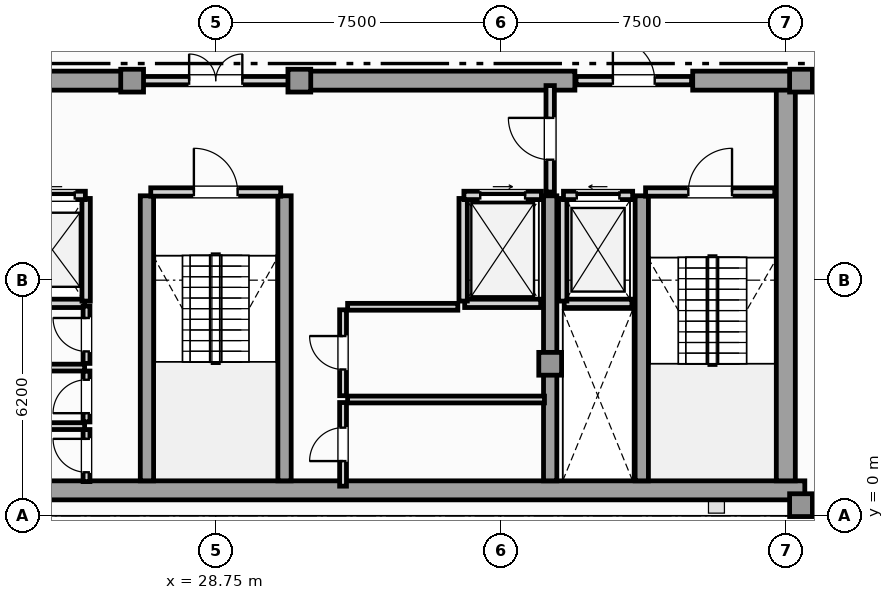
"""IFC4 building model, lengths in metres.
Left out: names, types, materials, properties, quantities, classifications, styles, units other than length and angle.
Written with IfcOpenShell. Run it as: python <this file> out.ifc"""

import sys

from ifc_helpers import new_model, si_unit, direction, frame, frame_2d, origin, origin_2d, place, context, subcontext, project, spatial, rectangle, extrude, element, fill, save


model = new_model("IFC4")
c1 = context("Model", 3, precision=1e-05, world=origin(), true_north=direction((0.0, 1.0)))
c2 = subcontext(c1, "Body", "Model", "MODEL_VIEW")
j1 = project(units=[si_unit("LENGTHUNIT", "METRE"), si_unit("PLANEANGLEUNIT", "RADIAN")], contexts=[c1])
p1 = place(None, origin())
s1 = spatial("IfcSite", under=j1, at=p1, CompositionType="ELEMENT")
p2 = place(p1, origin())
s2 = spatial("IfcBuilding", under=s1, at=p2, CompositionType="ELEMENT")
p3 = place(p2, frame((0.0, 0.0, 316.9)))
s3 = spatial("IfcBuildingStorey", under=s2, at=p3, CompositionType="ELEMENT", Elevation=316.9)
p4 = place(p3, frame((13.25, 0.67, 0.0), z_axis=(0.0, 0.0, 1.0), x_axis=(1.0, 0.0, 0.0)))
e1 = element("IfcWall", 1, at=p4, inside=s3, PredefinedType="SHEAR", context=c2, shape_type="SweptSolid", body=[
    extrude(rectangle(XDim=31.0, YDim=0.5, at=frame_2d((15.5, 0.0))), origin(), (0.0, 0.0, 1.0), 3.65),
])
p5 = place(p3, frame((43.75, 0.92, 0.0), z_axis=(0.0, 0.0, 1.0), x_axis=(0.0, 1.0, 0.0)))
e2 = element("IfcWall", 2, at=p5, inside=s3, PredefinedType="SHEAR", context=c2, shape_type="SweptSolid", body=[
    extrude(rectangle(XDim=10.53, YDim=0.5, at=frame_2d((5.265, 0.0))), origin(), (0.0, 0.0, 1.0), 3.65),
])
for number, where, z_axis, x_axis in (
    (3, (19.3, 11.45, 0.0), (0.0, 0.0, 1.0), (1.0, 0.0, 0.0)),
    (4, (30.9, 11.45, 0.0), (0.0, 0.0, 1.0), (1.0, 0.0, 0.0)),
):
    element("IfcWall", number, at=place(p3, frame(where, z_axis=z_axis, x_axis=x_axis)), inside=s3, PredefinedType="SHEAR", context=c2, shape_type="SweptSolid", body=[
        extrude(rectangle(XDim=7.3, YDim=0.5, at=frame_2d((3.65, 0.0))), origin(), (0.0, 0.0, 1.0), 3.65),
    ])
p6 = place(p3, frame((41.3, 11.45, 0.0), z_axis=(0.0, 0.0, 1.0), x_axis=(1.0, 0.0, 0.0)))
e5 = element("IfcWall", 5, at=p6, inside=s3, PredefinedType="SHEAR", context=c2, shape_type="SweptSolid", body=[
    extrude(rectangle(XDim=2.95, YDim=0.5, at=frame_2d((1.475, 0.0))), origin(), (0.0, 0.0, 1.0), 3.65),
])
for number, where, z_axis, x_axis in (
    (6, (26.94, 0.92, 0.0), (0.0, 0.0, 1.0), (0.0, 1.0, 0.0)),
    (7, (30.56, 0.92, 0.0), (0.0, 0.0, 1.0), (0.0, 1.0, 0.0)),
    (8, (37.55, 0.92, 0.0), (0.0, 0.0, 1.0), (0.0, 1.0, 0.0)),
    (9, (39.96, 0.92, 0.0), (0.0, 0.0, 1.0), (0.0, 1.0, 0.0)),
):
    element("IfcWall", number, at=place(p3, frame(where, z_axis=z_axis, x_axis=x_axis)), inside=s3, PredefinedType="SHEAR", context=c2, shape_type="SweptSolid", body=[
        extrude(rectangle(XDim=7.5, YDim=0.35, at=frame_2d((3.75, 0.0))), origin(), (0.0, 0.0, 1.0), 3.65),
    ])
for number, where, z_axis, x_axis in (
    (10, (44.15, 0.28, 0.0), (0.0, 0.0, 1.0), (1.0, 0.0, 0.0)),
    (11, (44.15, 11.45, 0.0), (0.0, 0.0, 1.0), (1.0, 0.0, 0.0)),
    (12, (37.55, 4.0, 0.0), (0.0, 0.0, 1.0), (1.0, 0.0, 0.0)),
    (13, (26.55, 11.45, 0.0), (0.0, 0.0, 1.0), (1.0, 0.0, 0.0)),
    (14, (30.95, 11.45, 0.0), (0.0, 0.0, 1.0), (1.0, 0.0, 0.0)),
):
    element("IfcColumn", number, at=place(p3, frame(where, z_axis=z_axis, x_axis=x_axis)), inside=s3, PredefinedType="COLUMN", context=c2, shape_type="SweptSolid", body=[
        extrude(rectangle(XDim=0.6, YDim=0.6, at=origin_2d()), origin(), (0.0, 0.0, 1.0), 3.85),
    ])
p7 = place(p3, frame((44.25, 0.18, 0.0), z_axis=(0.0, 0.0, 1.0), x_axis=(1.0, 0.0, 0.0)))
e15 = element("IfcWall", 15, at=p7, inside=s3, PredefinedType="SOLIDWALL", context=c2, shape_type="SweptSolid", body=[
    extrude(rectangle(XDim=1.017, YDim=0.26, at=frame_2d((0.509, 0.0))), origin(), (0.0, 0.0, 1.0), 3.65),
])
p8 = place(p3, frame((37.92, 5.59, 0.0), z_axis=(0.0, 0.0, 1.0), x_axis=(1.0, 0.0, 0.0)))
e16 = element("IfcWall", 16, at=p8, inside=s3, PredefinedType="SOLIDWALL", context=c2, shape_type="SweptSolid", body=[
    extrude(rectangle(XDim=1.78, YDim=0.22, at=frame_2d((0.89, 0.0))), origin(), (0.0, 0.0, 1.0), 3.65),
])
p9 = place(p3, frame((37.88, 5.65, 0.0), z_axis=(0.0, 0.0, 1.0), x_axis=(0.0, 1.0, 0.0)))
e17 = element("IfcWall", 17, at=p9, inside=s3, PredefinedType="SOLIDWALL", context=c2, shape_type="SweptSolid", body=[
    extrude(rectangle(XDim=2.7, YDim=0.22, at=frame_2d((1.35, 0.0))), origin(), (0.0, 0.0, 1.0), 3.65),
])
p10 = place(p3, frame((37.9, 8.43, 0.0), z_axis=(0.0, 0.0, 1.0), x_axis=(1.0, 0.0, 0.0)))
e18 = element("IfcWall", 18, at=p10, inside=s3, PredefinedType="SOLIDWALL", context=c2, shape_type="SweptSolid", body=[
    extrude(rectangle(XDim=1.82, YDim=0.22, at=frame_2d((0.91, 0.0))), origin(), (0.0, 0.0, 1.0), 3.65),
])
p11 = place(p10, frame((0.35, 0.0, 0.0)))
e19 = element("IfcOpeningElement", 19, at=p11, cuts=e18, PredefinedType="OPENING", context=c2, shape_type="SweptSolid", body=[
    extrude(rectangle(XDim=1.12, YDim=2.25, at=frame_2d((0.56, 1.125))), frame((0.0, 0.12, 0.0), z_axis=(0.0, -1.0, 0.0), x_axis=(1.0, 0.0, 0.0)), (0.0, 0.0, 1.0), 0.24),
])
p12 = place(p3, frame((35.3, 5.59, 0.0), z_axis=(0.0, 0.0, 1.0), x_axis=(1.0, 0.0, 0.0)))
e20 = element("IfcWall", 20, at=p12, inside=s3, PredefinedType="SOLIDWALL", context=c2, shape_type="SweptSolid", body=[
    extrude(rectangle(XDim=2.0, YDim=0.22, at=frame_2d((1.0, 0.0))), origin(), (0.0, 0.0, 1.0), 3.65),
])
p13 = place(p3, frame((35.26, 5.65, 0.0), z_axis=(0.0, 0.0, 1.0), x_axis=(0.0, 1.0, 0.0)))
e21 = element("IfcWall", 21, at=p13, inside=s3, PredefinedType="SOLIDWALL", context=c2, shape_type="SweptSolid", body=[
    extrude(rectangle(XDim=2.7, YDim=0.22, at=frame_2d((1.35, 0.0))), origin(), (0.0, 0.0, 1.0), 3.65),
])
p14 = place(p3, frame((35.28, 8.43, 0.0), z_axis=(0.0, 0.0, 1.0), x_axis=(1.0, 0.0, 0.0)))
e22 = element("IfcWall", 22, at=p14, inside=s3, PredefinedType="SOLIDWALL", context=c2, shape_type="SweptSolid", body=[
    extrude(rectangle(XDim=2.04, YDim=0.22, at=frame_2d((1.02, 0.0))), origin(), (0.0, 0.0, 1.0), 3.65),
])
p15 = place(p14, frame((0.43, 0.0, 0.0)))
e23 = element("IfcOpeningElement", 23, at=p15, cuts=e22, PredefinedType="OPENING", context=c2, shape_type="SweptSolid", body=[
    extrude(rectangle(XDim=1.18, YDim=2.2, at=frame_2d((0.59, 1.1))), frame((0.0, 0.12, 0.0), z_axis=(0.0, -1.0, 0.0), x_axis=(1.0, 0.0, 0.0)), (0.0, 0.0, 1.0), 0.24),
])
p16 = place(p3, frame((23.6, 5.59, 0.0), z_axis=(0.0, 0.0, 1.0), x_axis=(1.0, 0.0, 0.0)))
e24 = element("IfcWall", 24, at=p16, inside=s3, PredefinedType="SOLIDWALL", context=c2, shape_type="SweptSolid", body=[
    extrude(rectangle(XDim=1.7, YDim=0.22, at=frame_2d((0.85, 0.0))), origin(), (0.0, 0.0, 1.0), 3.65),
])
p17 = place(p3, frame((25.34, 5.65, 0.0), z_axis=(0.0, 0.0, 1.0), x_axis=(0.0, 1.0, 0.0)))
e25 = element("IfcWall", 25, at=p17, inside=s3, PredefinedType="SOLIDWALL", context=c2, shape_type="SweptSolid", body=[
    extrude(rectangle(XDim=2.7, YDim=0.22, at=frame_2d((1.35, 0.0))), origin(), (0.0, 0.0, 1.0), 3.65),
])
p18 = place(p3, frame((23.58, 8.43, 0.0), z_axis=(0.0, 0.0, 1.0), x_axis=(1.0, 0.0, 0.0)))
e26 = element("IfcWall", 26, at=p18, inside=s3, PredefinedType="SOLIDWALL", context=c2, shape_type="SweptSolid", body=[
    extrude(rectangle(XDim=1.74, YDim=0.22, at=frame_2d((0.87, 0.0))), origin(), (0.0, 0.0, 1.0), 3.65),
])
p19 = place(p18, frame((0.28, 0.0, 0.0)))
e27 = element("IfcOpeningElement", 27, at=p19, cuts=e26, PredefinedType="OPENING", context=c2, shape_type="SweptSolid", body=[
    extrude(rectangle(XDim=1.18, YDim=2.2, at=frame_2d((0.59, 1.1))), frame((0.0, 0.12, 0.0), z_axis=(0.0, -1.0, 0.0), x_axis=(1.0, 0.0, 0.0)), (0.0, 0.0, 1.0), 0.24),
])
p20 = place(p3, frame((40.06, 8.52, 0.0), z_axis=(0.0, 0.0, 1.0), x_axis=(1.0, 0.0, 0.0)))
e28 = element("IfcWall", 28, at=p20, inside=s3, PredefinedType="SOLIDWALL", context=c2, shape_type="SweptSolid", body=[
    extrude(rectangle(XDim=3.4, YDim=0.22, at=frame_2d((1.7, 0.0))), origin(), (0.0, 0.0, 1.0), 3.65),
])
p21 = place(p20, frame((1.125, 0.0, 0.0)))
e29 = element("IfcOpeningElement", 29, at=p21, cuts=e28, PredefinedType="OPENING", context=c2, shape_type="SweptSolid", body=[
    extrude(rectangle(XDim=1.15, YDim=2.2, at=frame_2d((0.575, 1.1))), frame((0.0, 0.12, 0.0), z_axis=(0.0, -1.0, 0.0), x_axis=(1.0, 0.0, 0.0)), (0.0, 0.0, 1.0), 0.24),
])
p22 = place(p3, frame((27.04, 8.52, 0.0), z_axis=(0.0, 0.0, 1.0), x_axis=(1.0, 0.0, 0.0)))
e30 = element("IfcWall", 30, at=p22, inside=s3, PredefinedType="SOLIDWALL", context=c2, shape_type="SweptSolid", body=[
    extrude(rectangle(XDim=3.42, YDim=0.22, at=frame_2d((1.71, 0.0))), origin(), (0.0, 0.0, 1.0), 3.65),
])
p23 = place(p22, frame((1.135, 0.0, 0.0)))
e31 = element("IfcOpeningElement", 31, at=p23, cuts=e30, PredefinedType="OPENING", context=c2, shape_type="SweptSolid", body=[
    extrude(rectangle(XDim=1.15, YDim=2.2, at=frame_2d((0.575, 1.1))), frame((0.0, 0.12, 0.0), z_axis=(0.0, -1.0, 0.0), x_axis=(1.0, 0.0, 0.0)), (0.0, 0.0, 1.0), 0.24),
])
p24 = place(p3, frame((37.55, 8.52, 0.0), z_axis=(0.0, 0.0, 1.0), x_axis=(0.0, 1.0, 0.0)))
e32 = element("IfcWall", 32, at=p24, inside=s3, PredefinedType="SOLIDWALL", context=c2, shape_type="SweptSolid", body=[
    extrude(rectangle(XDim=2.8, YDim=0.22, at=frame_2d((1.4, 0.0))), origin(), (0.0, 0.0, 1.0), 3.106),
])
p25 = place(p24, frame((0.85, 0.0, 0.0)))
e33 = element("IfcOpeningElement", 33, at=p25, cuts=e32, PredefinedType="OPENING", context=c2, shape_type="SweptSolid", body=[
    extrude(rectangle(XDim=1.1, YDim=2.2, at=frame_2d((0.55, 1.1))), frame((0.0, 0.12, 0.0), z_axis=(0.0, -1.0, 0.0), x_axis=(1.0, 0.0, 0.0)), (0.0, 0.0, 1.0), 0.24),
])
p26 = place(p3, frame((26.63, 11.45, 0.0), z_axis=(0.0, 0.0, 1.0), x_axis=(1.0, 0.0, 0.0)))
e34 = element("IfcWall", 34, at=p26, inside=s3, PredefinedType="SOLIDWALL", context=c2, shape_type="SweptSolid", body=[
    extrude(rectangle(XDim=4.24, YDim=0.22, at=frame_2d((2.12, 0.0))), origin(), (0.0, 0.0, 1.0), 3.65),
])
p27 = place(p26, frame((1.42, 0.0, 0.0)))
e35 = element("IfcOpeningElement", 35, at=p27, cuts=e34, PredefinedType="OPENING", context=c2, shape_type="SweptSolid", body=[
    extrude(rectangle(XDim=1.4, YDim=2.2, at=frame_2d((0.7, 1.1))), frame((0.0, 0.12, 0.0), z_axis=(0.0, -1.0, 0.0), x_axis=(1.0, 0.0, 0.0)), (0.0, 0.0, 1.0), 0.24),
])
p28 = place(p3, frame((38.23, 11.45, 0.0), z_axis=(0.0, 0.0, 1.0), x_axis=(1.0, 0.0, 0.0)))
e36 = element("IfcWall", 36, at=p28, inside=s3, PredefinedType="SOLIDWALL", context=c2, shape_type="SweptSolid", body=[
    extrude(rectangle(XDim=3.04, YDim=0.22, at=frame_2d((1.52, 0.0))), origin(), (0.0, 0.0, 1.0), 3.65),
])
p29 = place(p28, frame((0.97, 0.0, 0.0)))
e37 = element("IfcOpeningElement", 37, at=p29, cuts=e36, PredefinedType="OPENING", context=c2, shape_type="SweptSolid", body=[
    extrude(rectangle(XDim=1.1, YDim=2.2, at=frame_2d((0.55, 1.1))), frame((0.0, 0.12, 0.0), z_axis=(0.0, -1.0, 0.0), x_axis=(1.0, 0.0, 0.0)), (0.0, 0.0, 1.0), 0.24),
])
p30 = place(p3, frame((25.35, 0.9, 0.0), z_axis=(0.0, 0.0, 1.0), x_axis=(0.0, 1.0, 0.0)))
e38 = element("IfcWall", 38, at=p30, inside=s3, PredefinedType="PARTITIONING", context=c2, shape_type="SweptSolid", body=[
    extrude(rectangle(XDim=1.37, YDim=0.18, at=frame_2d((0.685, 0.0))), origin(), (0.0, 0.0, 1.0), 3.65),
])
p31 = place(p30, frame((0.245, 0.0, 0.0)))
e39 = element("IfcOpeningElement", 39, at=p31, cuts=e38, PredefinedType="OPENING", context=c2, shape_type="SweptSolid", body=[
    extrude(rectangle(XDim=0.88, YDim=2.05, at=frame_2d((0.44, 1.025))), frame((0.0, 0.1, 0.0), z_axis=(0.0, -1.0, 0.0), x_axis=(1.0, 0.0, 0.0)), (0.0, 0.0, 1.0), 0.2),
])
p32 = place(p3, frame((21.36, 2.36, 0.0), z_axis=(0.0, 0.0, 1.0), x_axis=(1.0, 0.0, 0.0)))
e40 = element("IfcWall", 40, at=p32, inside=s3, PredefinedType="PARTITIONING", context=c2, shape_type="SweptSolid", body=[
    extrude(rectangle(XDim=3.94, YDim=0.18, at=frame_2d((1.97, 0.0))), origin(), (0.0, 0.0, 1.0), 3.65),
])
p33 = place(p3, frame((25.35, 2.47, 0.0), z_axis=(0.0, 0.0, 1.0), x_axis=(0.0, 1.0, 0.0)))
e41 = element("IfcWall", 41, at=p33, inside=s3, PredefinedType="PARTITIONING", context=c2, shape_type="SweptSolid", body=[
    extrude(rectangle(XDim=1.34, YDim=0.18, at=frame_2d((0.67, 0.0))), origin(), (0.0, 0.0, 1.0), 3.65),
])
p34 = place(p33, frame((0.23, 0.0, 0.0)))
e42 = element("IfcOpeningElement", 42, at=p34, cuts=e41, PredefinedType="OPENING", context=c2, shape_type="SweptSolid", body=[
    extrude(rectangle(XDim=0.88, YDim=2.05, at=frame_2d((0.44, 1.025))), frame((0.0, 0.1, 0.0), z_axis=(0.0, -1.0, 0.0), x_axis=(1.0, 0.0, 0.0)), (0.0, 0.0, 1.0), 0.2),
])
p35 = place(p3, frame((21.36, 3.9, 0.0), z_axis=(0.0, 0.0, 1.0), x_axis=(1.0, 0.0, 0.0)))
e43 = element("IfcWall", 43, at=p35, inside=s3, PredefinedType="PARTITIONING", context=c2, shape_type="SweptSolid", body=[
    extrude(rectangle(XDim=3.94, YDim=0.18, at=frame_2d((1.97, 0.0))), origin(), (0.0, 0.0, 1.0), 3.65),
])
p36 = place(p3, frame((25.35, 4.01, 0.0), z_axis=(0.0, 0.0, 1.0), x_axis=(0.0, 1.0, 0.0)))
e44 = element("IfcWall", 44, at=p36, inside=s3, PredefinedType="PARTITIONING", context=c2, shape_type="SweptSolid", body=[
    extrude(rectangle(XDim=1.51, YDim=0.18, at=frame_2d((0.755, 0.0))), origin(), (0.0, 0.0, 1.0), 3.65),
])
p37 = place(p36, frame((0.315, 0.0, 0.0)))
e45 = element("IfcOpeningElement", 45, at=p37, cuts=e44, PredefinedType="OPENING", context=c2, shape_type="SweptSolid", body=[
    extrude(rectangle(XDim=0.88, YDim=2.05, at=frame_2d((0.44, 1.025))), frame((0.0, 0.1, 0.0), z_axis=(0.0, -1.0, 0.0), x_axis=(1.0, 0.0, 0.0)), (0.0, 0.0, 1.0), 0.2),
])
p38 = place(p3, frame((32.1, 0.78, 0.0), z_axis=(0.0, 0.0, 1.0), x_axis=(0.0, 1.0, 0.0)))
e46 = element("IfcWall", 46, at=p38, inside=s3, PredefinedType="PARTITIONING", context=c2, shape_type="SweptSolid", body=[
    extrude(rectangle(XDim=2.2, YDim=0.18, at=frame_2d((1.1, 0.0))), origin(), (0.0, 0.0, 1.0), 3.65),
])
p39 = place(p38, frame((0.66, 0.0, 0.0)))
e47 = element("IfcOpeningElement", 47, at=p39, cuts=e46, PredefinedType="OPENING", context=c2, shape_type="SweptSolid", body=[
    extrude(rectangle(XDim=0.88, YDim=2.05, at=frame_2d((0.44, 1.025))), frame((0.0, 0.1, 0.0), z_axis=(0.0, -1.0, 0.0), x_axis=(1.0, 0.0, 0.0)), (0.0, 0.0, 1.0), 0.2),
])
p40 = place(p3, frame((32.22, 3.06, 0.0), z_axis=(0.0, 0.0, 1.0), x_axis=(1.0, 0.0, 0.0)))
e48 = element("IfcWall", 48, at=p40, inside=s3, PredefinedType="PARTITIONING", context=c2, shape_type="SweptSolid", body=[
    extrude(rectangle(XDim=5.18, YDim=0.18, at=frame_2d((2.59, 0.0))), origin(), (0.0, 0.0, 1.0), 3.65),
])
p41 = place(p3, frame((32.1, 3.16, 0.0), z_axis=(0.0, 0.0, 1.0), x_axis=(0.0, 1.0, 0.0)))
e49 = element("IfcWall", 49, at=p41, inside=s3, PredefinedType="PARTITIONING", context=c2, shape_type="SweptSolid", body=[
    extrude(rectangle(XDim=2.26, YDim=0.18, at=frame_2d((1.13, 0.0))), origin(), (0.0, 0.0, 1.0), 3.65),
])
p42 = place(p41, frame((0.69, 0.0, 0.0)))
e50 = element("IfcOpeningElement", 50, at=p42, cuts=e49, PredefinedType="OPENING", context=c2, shape_type="SweptSolid", body=[
    extrude(rectangle(XDim=0.88, YDim=2.05, at=frame_2d((0.44, 1.025))), frame((0.0, 0.1, 0.0), z_axis=(0.0, -1.0, 0.0), x_axis=(1.0, 0.0, 0.0)), (0.0, 0.0, 1.0), 0.2),
])
p43 = place(p3, frame((32.22, 5.5, 0.0), z_axis=(0.0, 0.0, 1.0), x_axis=(1.0, 0.0, 0.0)))
e51 = element("IfcWall", 51, at=p43, inside=s3, PredefinedType="PARTITIONING", context=c2, shape_type="SweptSolid", body=[
    extrude(rectangle(XDim=2.9, YDim=0.18, at=frame_2d((1.45, 0.0))), origin(), (0.0, 0.0, 1.0), 3.65),
])
p44 = place(p3, frame((44.355, 11.6, 0.0), z_axis=(0.0, 0.0, 1.0), x_axis=(1.0, 0.0, 0.0)))
e52 = element("IfcWall", 52, at=p44, inside=s3, PredefinedType="PARTITIONING", context=c2, shape_type="SweptSolid", body=[
    extrude(rectangle(XDim=4.002, YDim=0.18, at=frame_2d((2.001, 0.0))), origin(), (0.0, 0.0, 1.0), 3.65),
])
p45 = place(p44, frame((1.501, 0.0, 0.0)))
e53 = element("IfcOpeningElement", 53, at=p45, cuts=e52, PredefinedType="OPENING", context=c2, shape_type="SweptSolid", body=[
    extrude(rectangle(XDim=1.0, YDim=2.15, at=frame_2d((0.5, 1.075))), frame((0.0, 0.1, 0.0), z_axis=(0.0, -1.0, 0.0), x_axis=(1.0, 0.0, 0.0)), (0.0, 0.0, 1.0), 0.2),
])
p46 = place(p11, origin())
e54 = element("IfcDoor", 54, at=p46, inside=s3, OperationType="SLIDING_TO_LEFT", PredefinedType="DOOR", context=c2, shape_type="SweptSolid", body=[
    extrude(rectangle(XDim=1.12, YDim=2.25, at=frame_2d((0.56, 1.125))), frame((0.0, 0.025, 0.0), z_axis=(0.0, -1.0, 0.0), x_axis=(1.0, 0.0, 0.0)), (0.0, 0.0, 1.0), 0.05),
])
fill(e19, e54)
p47 = place(p15, origin())
e55 = element("IfcDoor", 55, at=p47, inside=s3, OperationType="SLIDING_TO_RIGHT", PredefinedType="DOOR", context=c2, shape_type="SweptSolid", body=[
    extrude(rectangle(XDim=1.18, YDim=2.2, at=frame_2d((0.59, 1.1))), frame((0.0, 0.025, 0.0), z_axis=(0.0, -1.0, 0.0), x_axis=(1.0, 0.0, 0.0)), (0.0, 0.0, 1.0), 0.05),
])
fill(e23, e55)
p48 = place(p19, origin())
e56 = element("IfcDoor", 56, at=p48, inside=s3, OperationType="SLIDING_TO_LEFT", PredefinedType="DOOR", context=c2, shape_type="SweptSolid", body=[
    extrude(rectangle(XDim=1.18, YDim=2.2, at=frame_2d((0.59, 1.1))), frame((0.0, 0.025, 0.0), z_axis=(0.0, -1.0, 0.0), x_axis=(1.0, 0.0, 0.0)), (0.0, 0.0, 1.0), 0.05),
])
fill(e27, e56)
p49 = place(p21, origin())
e57 = element("IfcDoor", 57, at=p49, inside=s3, OperationType="SINGLE_SWING_RIGHT", PredefinedType="DOOR", context=c2, shape_type="SweptSolid", body=[
    extrude(rectangle(XDim=1.15, YDim=2.2, at=frame_2d((0.575, 1.1))), frame((0.0, 0.025, 0.0), z_axis=(0.0, -1.0, 0.0), x_axis=(1.0, 0.0, 0.0)), (0.0, 0.0, 1.0), 0.05),
])
fill(e29, e57)
p50 = place(p23, origin())
e58 = element("IfcDoor", 58, at=p50, inside=s3, OperationType="SINGLE_SWING_LEFT", PredefinedType="DOOR", context=c2, shape_type="SweptSolid", body=[
    extrude(rectangle(XDim=1.15, YDim=2.2, at=frame_2d((0.575, 1.1))), frame((0.0, 0.025, 0.0), z_axis=(0.0, -1.0, 0.0), x_axis=(1.0, 0.0, 0.0)), (0.0, 0.0, 1.0), 0.05),
])
fill(e31, e58)
p51 = place(p25, origin())
e59 = element("IfcDoor", 59, at=p51, inside=s3, OperationType="SINGLE_SWING_RIGHT", PredefinedType="DOOR", context=c2, shape_type="SweptSolid", body=[
    extrude(rectangle(XDim=1.1, YDim=2.2, at=frame_2d((0.55, 1.1))), frame((0.0, 0.025, 0.0), z_axis=(0.0, -1.0, 0.0), x_axis=(1.0, 0.0, 0.0)), (0.0, 0.0, 1.0), 0.05),
])
fill(e33, e59)
p52 = place(p27, origin())
e60 = element("IfcDoor", 60, at=p52, inside=s3, OperationType="DOUBLE_DOOR_SINGLE_SWING", PredefinedType="DOOR", context=c2, shape_type="SweptSolid", body=[
    extrude(rectangle(XDim=1.4, YDim=2.2, at=frame_2d((0.7, 1.1))), frame((0.0, 0.025, 0.0), z_axis=(0.0, -1.0, 0.0), x_axis=(1.0, 0.0, 0.0)), (0.0, 0.0, 1.0), 0.05),
])
fill(e35, e60)
p53 = place(p29, origin())
e61 = element("IfcDoor", 61, at=p53, inside=s3, OperationType="SINGLE_SWING_LEFT", PredefinedType="DOOR", context=c2, shape_type="SweptSolid", body=[
    extrude(rectangle(XDim=1.1, YDim=2.2, at=frame_2d((0.55, 1.1))), frame((0.0, 0.025, 0.0), z_axis=(0.0, -1.0, 0.0), x_axis=(1.0, 0.0, 0.0)), (0.0, 0.0, 1.0), 0.05),
])
fill(e37, e61)
p54 = place(p31, origin())
e62 = element("IfcDoor", 62, at=p54, inside=s3, OperationType="SINGLE_SWING_RIGHT", PredefinedType="DOOR", context=c2, shape_type="SweptSolid", body=[
    extrude(rectangle(XDim=0.88, YDim=2.05, at=frame_2d((0.44, 1.025))), frame((0.0, 0.025, 0.0), z_axis=(0.0, -1.0, 0.0), x_axis=(1.0, 0.0, 0.0)), (0.0, 0.0, 1.0), 0.05),
])
fill(e39, e62)
p55 = place(p34, origin())
e63 = element("IfcDoor", 63, at=p55, inside=s3, OperationType="SINGLE_SWING_LEFT", PredefinedType="DOOR", context=c2, shape_type="SweptSolid", body=[
    extrude(rectangle(XDim=0.88, YDim=2.05, at=frame_2d((0.44, 1.025))), frame((0.0, 0.025, 0.0), z_axis=(0.0, -1.0, 0.0), x_axis=(1.0, 0.0, 0.0)), (0.0, 0.0, 1.0), 0.05),
])
fill(e42, e63)
p56 = place(p37, origin())
e64 = element("IfcDoor", 64, at=p56, inside=s3, OperationType="SINGLE_SWING_RIGHT", PredefinedType="DOOR", context=c2, shape_type="SweptSolid", body=[
    extrude(rectangle(XDim=0.88, YDim=2.05, at=frame_2d((0.44, 1.025))), frame((0.0, 0.025, 0.0), z_axis=(0.0, -1.0, 0.0), x_axis=(1.0, 0.0, 0.0)), (0.0, 0.0, 1.0), 0.05),
])
fill(e45, e64)
p57 = place(p39, origin())
e65 = element("IfcDoor", 65, at=p57, inside=s3, OperationType="SINGLE_SWING_LEFT", PredefinedType="DOOR", context=c2, shape_type="SweptSolid", body=[
    extrude(rectangle(XDim=0.88, YDim=2.05, at=frame_2d((0.44, 1.025))), frame((0.0, 0.025, 0.0), z_axis=(0.0, -1.0, 0.0), x_axis=(1.0, 0.0, 0.0)), (0.0, 0.0, 1.0), 0.05),
])
fill(e47, e65)
p58 = place(p42, origin())
e66 = element("IfcDoor", 66, at=p58, inside=s3, OperationType="SINGLE_SWING_RIGHT", PredefinedType="DOOR", context=c2, shape_type="SweptSolid", body=[
    extrude(rectangle(XDim=0.88, YDim=2.05, at=frame_2d((0.44, 1.025))), frame((0.0, 0.025, 0.0), z_axis=(0.0, -1.0, 0.0), x_axis=(1.0, 0.0, 0.0)), (0.0, 0.0, 1.0), 0.05),
])
fill(e50, e66)
save(model, sys.argv[1])
